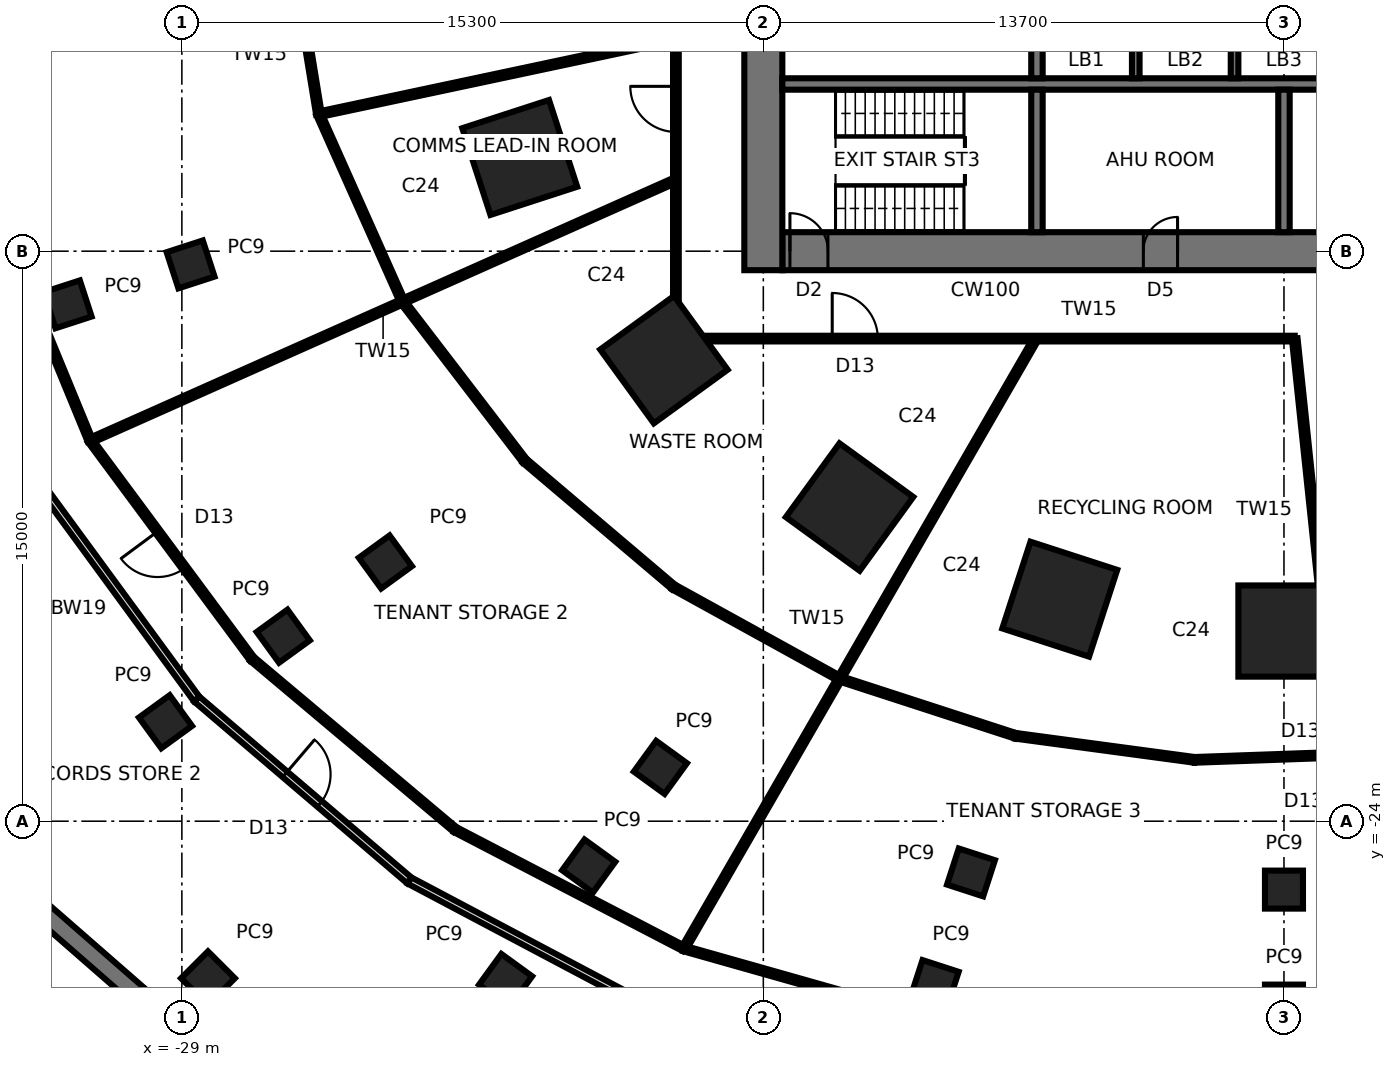
"""IFC4 building model, lengths in metres.
Left out: names, types, materials, properties, quantities, classifications, styles, units other than length and angle.
Written with IfcOpenShell. Run it as: python <this file> out.ifc"""

import sys

from ifc_helpers import new_model, si_unit, direction, frame, frame_2d, origin, origin_2d, place, context, subcontext, project, spatial, rectangle, extrude, element, fill, save


model = new_model("IFC4")
c1 = context("Model", 3, precision=1e-05, world=origin(), true_north=direction((0.0, 1.0)))
c2 = subcontext(c1, "Body", "Model", "MODEL_VIEW")
j1 = project(units=[si_unit("LENGTHUNIT", "METRE"), si_unit("PLANEANGLEUNIT", "RADIAN")], contexts=[c1])
p1 = place(None, origin())
s1 = spatial("IfcSite", under=j1, at=p1, CompositionType="ELEMENT")
p2 = place(p1, origin())
s2 = spatial("IfcBuilding", under=s1, at=p2, CompositionType="ELEMENT")
p3 = place(p2, frame((0.0, 0.0, -5.0)))
s3 = spatial("IfcBuildingStorey", under=s2, at=p3, CompositionType="ELEMENT", Elevation=-5.0)
p4 = place(p3, frame((-34.323, -24.937, -0.15), z_axis=(0.0, 0.0, 1.0), x_axis=(0.753323689885, -0.657649920747, 0.0)))
e1 = element("IfcWall", 1, at=p4, inside=s3, PredefinedType="SOLIDWALL", context=c2, shape_type="SweptSolid", body=[
    extrude(rectangle(XDim=8.822, YDim=0.5, at=frame_2d((4.411, 0.0))), origin(), (0.0, 0.0, 1.0), 4.95),
])
for number, where, z_axis, x_axis in (
    (2, (-20.109, -6.534, -0.15), (0.0, 0.0, 1.0), (-0.951, -0.309, 0.0)),
    (3, (-16.315, -11.854, -0.15), (0.0, 0.0, 1.0), (-0.809, -0.588, 0.0)),
    (4, (-11.43, -15.733, -0.15), (0.0, 0.0, 1.0), (-0.588, -0.809, 0.0)),
    (5, (-5.9, -18.157, -0.15), (0.0, 0.0, 1.0), (-0.309, -0.951, 0.0)),
    (6, (0.0, -18.996, -0.15), (0.0, 0.0, 1.0), (0.0, -1.0, 0.0)),
):
    element("IfcColumn", number, at=place(p3, frame(where, z_axis=z_axis, x_axis=x_axis)), inside=s3, PredefinedType="COLUMN", context=c2, shape_type="SweptSolid", body=[
        extrude(rectangle(XDim=2.4, YDim=2.4, at=origin_2d()), origin(), (0.0, 0.0, 1.0), 5.15),
    ])
for number, where, z_axis, x_axis in (
    (7, (-28.313, -28.133, -0.15), (0.0, 0.0, 1.0), (-0.707, -0.707, 0.0)),
    (8, (-29.431, -21.383, -0.15), (0.0, 0.0, 1.0), (-0.809, -0.588, 0.0)),
    (9, (-20.483, -28.192, -0.15), (0.0, 0.0, 1.0), (-0.588, -0.809, 0.0)),
    (10, (-32.005, -10.399, -0.15), (0.0, 0.0, 1.0), (-0.951, -0.309, 0.0)),
    (11, (-26.332, -19.131, -0.15), (0.0, 0.0, 1.0), (-0.809, -0.588, 0.0)),
    (12, (-18.294, -25.18, -0.15), (0.0, 0.0, 1.0), (-0.588, -0.809, 0.0)),
    (13, (-9.19, -28.285, -0.15), (0.0, 0.0, 1.0), (-0.309, -0.951, 0.0)),
    (14, (0.0, -28.8, -0.15), (0.0, 0.0, 1.0), (0.0, -1.0, 0.0)),
    (15, (-28.77, -9.348, -0.15), (0.0, 0.0, 1.0), (-0.951, -0.309, 0.0)),
    (16, (-23.645, -17.179, -0.15), (0.0, 0.0, 1.0), (-0.809, -0.588, 0.0)),
    (17, (-16.409, -22.584, -0.15), (0.0, 0.0, 1.0), (-0.588, -0.809, 0.0)),
    (18, (-8.236, -25.347, -0.15), (0.0, 0.0, 1.0), (-0.309, -0.951, 0.0)),
    (19, (0.0, -25.8, -0.15), (0.0, 0.0, 1.0), (0.0, -1.0, 0.0)),
):
    element("IfcColumn", number, at=place(p3, frame(where, z_axis=z_axis, x_axis=x_axis)), inside=s3, PredefinedType="COLUMN", context=c2, shape_type="SweptSolid", body=[
        extrude(rectangle(XDim=1.0, YDim=1.0, at=origin_2d()), origin(), (0.0, 0.0, 1.0), 5.15),
    ])
p5 = place(p3, frame((-13.2, -9.0, -0.15), z_axis=(0.0, 0.0, 1.0), x_axis=(1.0, 0.0, 0.0)))
e20 = element("IfcWall", 20, at=p5, inside=s3, PredefinedType="SHEAR", context=c2, shape_type="SweptSolid", body=[
    extrude(rectangle(XDim=26.4, YDim=1.0, at=frame_2d((13.2, 0.0))), origin(), (0.0, 0.0, 1.0), 5.15),
])
p6 = place(p5, frame((0.2, 0.0, 0.15)))
e21 = element("IfcOpeningElement", 21, at=p6, cuts=e20, PredefinedType="OPENING", context=c2, shape_type="SweptSolid", body=[
    extrude(rectangle(XDim=1.0, YDim=2.1, at=frame_2d((0.5, 1.05))), frame((0.0, 0.51, 0.0), z_axis=(0.0, -1.0, 0.0), x_axis=(1.0, 0.0, 0.0)), (0.0, 0.0, 1.0), 1.02),
])
p7 = place(p5, frame((9.5, 0.0, 0.15)))
e22 = element("IfcOpeningElement", 22, at=p7, cuts=e20, PredefinedType="OPENING", context=c2, shape_type="SweptSolid", body=[
    extrude(rectangle(XDim=0.9, YDim=2.1, at=frame_2d((0.45, 1.05))), frame((0.0, 0.51, 0.0), z_axis=(0.0, -1.0, 0.0), x_axis=(1.0, 0.0, 0.0)), (0.0, 0.0, 1.0), 1.02),
])
p8 = place(p5, frame((16.0, 0.0, 0.15)))
e23 = element("IfcOpeningElement", 23, at=p8, cuts=e20, PredefinedType="OPENING", context=c2, shape_type="SweptSolid", body=[
    extrude(rectangle(XDim=0.9, YDim=2.1, at=frame_2d((0.45, 1.05))), frame((0.0, 0.51, 0.0), z_axis=(0.0, -1.0, 0.0), x_axis=(1.0, 0.0, 0.0)), (0.0, 0.0, 1.0), 1.02),
])
p9 = place(p5, frame((22.85, 0.0, 0.15)))
e24 = element("IfcOpeningElement", 24, at=p9, cuts=e20, PredefinedType="OPENING", context=c2, shape_type="SweptSolid", body=[
    extrude(rectangle(XDim=0.9, YDim=2.1, at=frame_2d((0.45, 1.05))), frame((0.0, 0.51, 0.0), z_axis=(0.0, -1.0, 0.0), x_axis=(1.0, 0.0, 0.0)), (0.0, 0.0, 1.0), 1.02),
])
p10 = place(p3, frame((-13.7, 9.5, -0.15), z_axis=(0.0, 0.0, 1.0), x_axis=(0.0, -1.0, 0.0)))
e25 = element("IfcWall", 25, at=p10, inside=s3, PredefinedType="SHEAR", context=c2, shape_type="SweptSolid", body=[
    extrude(rectangle(XDim=19.0, YDim=1.0, at=frame_2d((9.5, 0.0))), origin(), (0.0, 0.0, 1.0), 5.15),
])
p11 = place(p10, frame((8.6, 0.0, 0.15)))
e26 = element("IfcOpeningElement", 26, at=p11, cuts=e25, PredefinedType="OPENING", context=c2, shape_type="SweptSolid", body=[
    extrude(rectangle(XDim=1.8, YDim=2.4, at=frame_2d((0.9, 1.2))), frame((0.0, 0.51, 0.0), z_axis=(0.0, -1.0, 0.0), x_axis=(1.0, 0.0, 0.0)), (0.0, 0.0, 1.0), 1.02),
])
p12 = place(p3, frame((-13.2, -4.6, -0.15), z_axis=(0.0, 0.0, 1.0), x_axis=(1.0, 0.0, 0.0)))
e27 = element("IfcWall", 27, at=p12, inside=s3, PredefinedType="SHEAR", context=c2, shape_type="SweptSolid", body=[
    extrude(rectangle(XDim=26.4, YDim=0.3, at=frame_2d((13.2, 0.0))), origin(), (0.0, 0.0, 1.0), 5.15),
])
p13 = place(p3, frame((-6.5, -1.75, -0.15), z_axis=(0.0, 0.0, 1.0), x_axis=(0.0, -1.0, 0.0)))
e28 = element("IfcWall", 28, at=p13, inside=s3, PredefinedType="SHEAR", context=c2, shape_type="SweptSolid", body=[
    extrude(rectangle(XDim=2.7, YDim=0.3, at=frame_2d((1.35, 0.0))), origin(), (0.0, 0.0, 1.0), 5.15),
])
p14 = place(p3, frame((-6.5, -4.75, -0.15), z_axis=(0.0, 0.0, 1.0), x_axis=(0.0, -1.0, 0.0)))
e29 = element("IfcWall", 29, at=p14, inside=s3, PredefinedType="SHEAR", context=c2, shape_type="SweptSolid", body=[
    extrude(rectangle(XDim=3.75, YDim=0.3, at=frame_2d((1.875, 0.0))), origin(), (0.0, 0.0, 1.0), 5.15),
])
for number, where, z_axis, x_axis in (
    (30, (-3.9, -1.75, -0.15), (0.0, 0.0, 1.0), (0.0, -1.0, 0.0)),
    (31, (-1.3, -1.75, -0.15), (0.0, 0.0, 1.0), (0.0, -1.0, 0.0)),
):
    element("IfcWall", number, at=place(p3, frame(where, z_axis=z_axis, x_axis=x_axis)), inside=s3, PredefinedType="SHEAR", context=c2, shape_type="SweptSolid", body=[
        extrude(rectangle(XDim=2.7, YDim=0.2, at=frame_2d((1.35, 0.0))), origin(), (0.0, 0.0, 1.0), 5.15),
    ])
p15 = place(p3, frame((0.0, -4.75, -0.15), z_axis=(0.0, 0.0, 1.0), x_axis=(0.0, -1.0, 0.0)))
e32 = element("IfcWall", 32, at=p15, inside=s3, PredefinedType="SHEAR", context=c2, shape_type="SweptSolid", body=[
    extrude(rectangle(XDim=3.75, YDim=0.3, at=frame_2d((1.875, 0.0))), origin(), (0.0, 0.0, 1.0), 5.15),
])
p16 = place(p3, frame((-25.393, -5.397, 0.0), z_axis=(0.0, 0.0, 1.0), x_axis=(-0.161241932964, 0.986914909733, 0.0)))
e33 = element("IfcWall", 33, at=p16, inside=s3, PredefinedType="PARTITIONING", context=c2, shape_type="SweptSolid", body=[
    extrude(rectangle(XDim=5.469, YDim=0.15, at=frame_2d((2.734, 0.0))), origin(), (0.0, 0.0, 1.0), 4.8),
])
p17 = place(p3, frame((-16.0, -3.401, 0.0), z_axis=(0.0, 0.0, 1.0), x_axis=(-0.978147089661, -0.207914095214, 0.0)))
e34 = element("IfcWall", 34, at=p17, inside=s3, PredefinedType="PARTITIONING", context=c2, shape_type="SweptSolid", body=[
    extrude(rectangle(XDim=9.603, YDim=0.15, at=frame_2d((4.802, 0.0))), origin(), (0.0, 0.0, 1.0), 4.8),
])
p18 = place(p3, frame((-16.0, 2.481, 0.0), z_axis=(0.0, 0.0, 1.0), x_axis=(0.0, -1.0, 0.0)))
e35 = element("IfcWall", 35, at=p18, inside=s3, PredefinedType="PARTITIONING", context=c2, shape_type="SweptSolid", body=[
    extrude(rectangle(XDim=13.781, YDim=0.15, at=frame_2d((6.89, 0.0))), origin(), (0.0, 0.0, 1.0), 4.8),
])
p19 = place(p18, frame((7.143, 0.0, 0.0)))
e36 = element("IfcOpeningElement", 36, at=p19, cuts=e35, PredefinedType="OPENING", context=c2, shape_type="SweptSolid", body=[
    extrude(rectangle(XDim=1.2, YDim=2.1, at=frame_2d((0.6, 1.05))), frame((0.0, 0.085, 0.0), z_axis=(0.0, -1.0, 0.0), x_axis=(1.0, 0.0, 0.0)), (0.0, 0.0, 1.0), 0.17),
])
p20 = place(p3, frame((-23.193, -10.326, 0.0), z_axis=(0.0, 0.0, 1.0), x_axis=(-0.40763198254, 0.91314630088, 0.0)))
e37 = element("IfcWall", 37, at=p20, inside=s3, PredefinedType="PARTITIONING", context=c2, shape_type="SweptSolid", body=[
    extrude(rectangle(XDim=5.397, YDim=0.15, at=frame_2d((2.699, 0.0))), origin(), (0.0, 0.0, 1.0), 4.8),
])
p21 = place(p3, frame((-31.41, -13.985, 0.0), z_axis=(0.0, 0.0, 1.0), x_axis=(-0.380714323158, 0.924692707954, 0.0)))
e38 = element("IfcWall", 38, at=p21, inside=s3, PredefinedType="PARTITIONING", context=c2, shape_type="SweptSolid", body=[
    extrude(rectangle(XDim=7.268, YDim=0.15, at=frame_2d((3.634, 0.0))), origin(), (0.0, 0.0, 1.0), 4.8),
])
p22 = place(p3, frame((-16.0, -7.124, 0.0), z_axis=(0.0, 0.0, 1.0), x_axis=(-0.913549946031, -0.40672656184, 0.0)))
e39 = element("IfcWall", 39, at=p22, inside=s3, PredefinedType="PARTITIONING", context=c2, shape_type="SweptSolid", body=[
    extrude(rectangle(XDim=16.868, YDim=0.15, at=frame_2d((8.434, 0.0))), origin(), (0.0, 0.0, 1.0), 4.8),
])
p23 = place(p3, frame((-19.98, -14.516, 0.0), z_axis=(0.0, 0.0, 1.0), x_axis=(-0.608481047622, 0.793568405801, 0.0)))
e40 = element("IfcWall", 40, at=p23, inside=s3, PredefinedType="PARTITIONING", context=c2, shape_type="SweptSolid", body=[
    extrude(rectangle(XDim=5.28, YDim=0.15, at=frame_2d((2.64, 0.0))), origin(), (0.0, 0.0, 1.0), 4.8),
])
p24 = place(p3, frame((-27.153, -19.728, 0.0), z_axis=(0.0, 0.0, 1.0), x_axis=(-0.595449673077, 0.803392610641, 0.0)))
e41 = element("IfcWall", 41, at=p24, inside=s3, PredefinedType="PARTITIONING", context=c2, shape_type="SweptSolid", body=[
    extrude(rectangle(XDim=7.149, YDim=0.15, at=frame_2d((3.574, 0.0))), origin(), (0.0, 0.0, 1.0), 4.8),
])
p25 = place(p24, frame((2.974, 0.0, 0.0)))
e42 = element("IfcOpeningElement", 42, at=p25, cuts=e41, PredefinedType="OPENING", context=c2, shape_type="SweptSolid", body=[
    extrude(rectangle(XDim=1.2, YDim=2.4, at=frame_2d((0.6, 1.2))), frame((0.0, 0.085, 0.0), z_axis=(0.0, -1.0, 0.0), x_axis=(1.0, 0.0, 0.0)), (0.0, 0.0, 1.0), 0.17),
])
p26 = place(p3, frame((-33.054, -14.717, 0.0), z_axis=(0.0, 0.0, 1.0), x_axis=(0.590858446285, -0.806775245315, 0.0)))
e43 = element("IfcWall", 43, at=p26, inside=s3, PredefinedType="SOLIDWALL", context=c2, shape_type="SweptSolid", body=[
    extrude(rectangle(XDim=7.523, YDim=0.19, at=frame_2d((3.761, 0.0))), origin(), (0.0, 0.0, 1.0), 4.8),
])
p27 = place(p3, frame((-21.809, -24.222, 0.0), z_axis=(0.0, 0.0, 1.0), x_axis=(-0.765373437874, 0.643586435995, 0.0)))
e44 = element("IfcWall", 44, at=p27, inside=s3, PredefinedType="PARTITIONING", context=c2, shape_type="SweptSolid", body=[
    extrude(rectangle(XDim=6.982, YDim=0.15, at=frame_2d((3.491, 0.0))), origin(), (0.0, 0.0, 1.0), 4.8),
])
p28 = place(p3, frame((-16.062, -17.839, 0.0), z_axis=(0.0, 0.0, 1.0), x_axis=(-0.762708036384, 0.646742956077, 0.0)))
e45 = element("IfcWall", 45, at=p28, inside=s3, PredefinedType="PARTITIONING", context=c2, shape_type="SweptSolid", body=[
    extrude(rectangle(XDim=5.137, YDim=0.15, at=frame_2d((2.568, 0.0))), origin(), (0.0, 0.0, 1.0), 4.8),
])
p29 = place(p3, frame((-28.61, -20.786, 0.0), z_axis=(0.0, 0.0, 1.0), x_axis=(0.760805512378, -0.64897994756, 0.0)))
e46 = element("IfcWall", 46, at=p29, inside=s3, PredefinedType="SOLIDWALL", context=c2, shape_type="SweptSolid", body=[
    extrude(rectangle(XDim=7.355, YDim=0.19, at=frame_2d((3.678, 0.0))), origin(), (0.0, 0.0, 1.0), 4.8),
])
p30 = place(p29, frame((3.053, 0.0, 0.0)))
e47 = element("IfcOpeningElement", 47, at=p30, cuts=e46, PredefinedType="OPENING", context=c2, shape_type="SweptSolid", body=[
    extrude(rectangle(XDim=1.2, YDim=2.4, at=frame_2d((0.6, 1.2))), frame((0.0, 0.105, 0.0), z_axis=(0.0, -1.0, 0.0), x_axis=(1.0, 0.0, 0.0)), (0.0, 0.0, 1.0), 0.21),
])
p31 = place(p3, frame((-15.791, -27.35, 0.0), z_axis=(0.0, 0.0, 1.0), x_axis=(-0.887313425563, 0.461166873068, 0.0)))
e48 = element("IfcWall", 48, at=p31, inside=s3, PredefinedType="PARTITIONING", context=c2, shape_type="SweptSolid", body=[
    extrude(rectangle(XDim=6.783, YDim=0.15, at=frame_2d((3.392, 0.0))), origin(), (0.0, 0.0, 1.0), 4.8),
])
p32 = place(p3, frame((-23.014, -25.559, 0.0), z_axis=(0.0, 0.0, 1.0), x_axis=(0.883685814524, -0.468080528551, 0.0)))
e49 = element("IfcWall", 49, at=p32, inside=s3, PredefinedType="SOLIDWALL", context=c2, shape_type="SweptSolid", body=[
    extrude(rectangle(XDim=7.156, YDim=0.19, at=frame_2d((3.578, 0.0))), origin(), (0.0, 0.0, 1.0), 4.8),
])
p33 = place(p3, frame((-11.691, -20.25, 0.0), z_axis=(0.0, 0.0, 1.0), x_axis=(-0.875641162684, 0.482962269968, 0.0)))
e50 = element("IfcWall", 50, at=p33, inside=s3, PredefinedType="PARTITIONING", context=c2, shape_type="SweptSolid", body=[
    extrude(rectangle(XDim=4.992, YDim=0.15, at=frame_2d((2.496, 0.0))), origin(), (0.0, 0.0, 1.0), 4.8),
])
p34 = place(p3, frame((-16.0, -11.3, 0.0), z_axis=(0.0, 0.0, 1.0), x_axis=(1.0, 0.0, 0.0)))
e51 = element("IfcWall", 51, at=p34, inside=s3, PredefinedType="PARTITIONING", context=c2, shape_type="SweptSolid", body=[
    extrude(rectangle(XDim=16.283, YDim=0.15, at=frame_2d((8.141, 0.0))), origin(), (0.0, 0.0, 1.0), 4.8),
])
p35 = place(p34, frame((4.113, 0.0, 0.0)))
e52 = element("IfcOpeningElement", 52, at=p35, cuts=e51, PredefinedType="OPENING", context=c2, shape_type="SweptSolid", body=[
    extrude(rectangle(XDim=1.2, YDim=2.4, at=frame_2d((0.6, 1.2))), frame((0.0, 0.085, 0.0), z_axis=(0.0, -1.0, 0.0), x_axis=(1.0, 0.0, 0.0)), (0.0, 0.0, 1.0), 0.17),
])
p36 = place(p3, frame((-6.524, -11.3, 0.0), z_axis=(0.0, 0.0, 1.0), x_axis=(-0.499999933838, -0.866025441983, 0.0)))
e53 = element("IfcWall", 53, at=p36, inside=s3, PredefinedType="PARTITIONING", context=c2, shape_type="SweptSolid", body=[
    extrude(rectangle(XDim=18.533, YDim=0.15, at=frame_2d((9.266, 0.0))), origin(), (0.0, 0.0, 1.0), 4.8),
])
p37 = place(p3, frame((-9.468, -29.139, 0.0), z_axis=(0.0, 0.0, 1.0), x_axis=(-0.962199616319, 0.272345182362, 0.0)))
e54 = element("IfcWall", 54, at=p37, inside=s3, PredefinedType="PARTITIONING", context=c2, shape_type="SweptSolid", body=[
    extrude(rectangle(XDim=6.571, YDim=0.15, at=frame_2d((3.285, 0.0))), origin(), (0.0, 0.0, 1.0), 4.8),
])
p38 = place(p3, frame((-7.068, -21.752, 0.0), z_axis=(0.0, 0.0, 1.0), x_axis=(-0.951027056342, 0.309107648085, 0.0)))
e55 = element("IfcWall", 55, at=p38, inside=s3, PredefinedType="PARTITIONING", context=c2, shape_type="SweptSolid", body=[
    extrude(rectangle(XDim=4.861, YDim=0.15, at=frame_2d((2.431, 0.0))), origin(), (0.0, 0.0, 1.0), 4.8),
])
p39 = place(p3, frame((-2.353, -22.386, 0.0), z_axis=(0.0, 0.0, 1.0), x_axis=(-0.991085698144, 0.133225894386, 0.0)))
e56 = element("IfcWall", 56, at=p39, inside=s3, PredefinedType="PARTITIONING", context=c2, shape_type="SweptSolid", body=[
    extrude(rectangle(XDim=4.757, YDim=0.15, at=frame_2d((2.379, 0.0))), origin(), (0.0, 0.0, 1.0), 4.8),
])
p40 = place(p3, frame((1.434, -22.252, 0.0), z_axis=(0.0, 0.0, 1.0), x_axis=(-0.999374131302, -0.035374364802, 0.0)))
e57 = element("IfcWall", 57, at=p40, inside=s3, PredefinedType="PARTITIONING", context=c2, shape_type="SweptSolid", body=[
    extrude(rectangle(XDim=3.789, YDim=0.15, at=frame_2d((1.895, 0.0))), origin(), (0.0, 0.0, 1.0), 4.8),
])
p41 = place(p3, frame((0.283, -11.3, 0.0), z_axis=(0.0, 0.0, 1.0), x_axis=(0.104534657703, -0.994521244287, 0.0)))
e58 = element("IfcWall", 58, at=p41, inside=s3, PredefinedType="PARTITIONING", context=c2, shape_type="SweptSolid", body=[
    extrude(rectangle(XDim=18.2, YDim=0.15, at=frame_2d((9.1, 0.0))), origin(), (0.0, 0.0, 1.0), 4.8),
])
p42 = place(p41, frame((8.95, 0.0, 0.0)))
e59 = element("IfcOpeningElement", 59, at=p42, cuts=e58, PredefinedType="OPENING", context=c2, shape_type="SweptSolid", body=[
    extrude(rectangle(XDim=1.2, YDim=2.4, at=frame_2d((0.6, 1.2))), frame((0.0, 0.085, 0.0), z_axis=(0.0, -1.0, 0.0), x_axis=(1.0, 0.0, 0.0)), (0.0, 0.0, 1.0), 0.17),
])
p43 = place(p41, frame((14.586, 0.0, 0.0)))
e60 = element("IfcOpeningElement", 60, at=p43, cuts=e58, PredefinedType="OPENING", context=c2, shape_type="SweptSolid", body=[
    extrude(rectangle(XDim=1.2, YDim=2.4, at=frame_2d((0.6, 1.2))), frame((0.0, 0.085, 0.0), z_axis=(0.0, -1.0, 0.0), x_axis=(1.0, 0.0, 0.0)), (0.0, 0.0, 1.0), 0.17),
])
p44 = place(p6, origin())
e61 = element("IfcDoor", 61, at=p44, inside=s3, OperationType="SINGLE_SWING_LEFT", PredefinedType="DOOR", context=c2, shape_type="SweptSolid", body=[
    extrude(rectangle(XDim=0.92, YDim=2.06, at=frame_2d((0.5, 1.03))), frame((0.0, 0.025, 0.0), z_axis=(0.0, -1.0, 0.0), x_axis=(1.0, 0.0, 0.0)), (0.0, 0.0, 1.0), 0.05),
    extrude(rectangle(XDim=0.04, YDim=2.1, at=frame_2d((0.02, 1.05))), frame((0.0, 0.25, 0.0), z_axis=(0.0, -1.0, 0.0), x_axis=(1.0, 0.0, 0.0)), (0.0, 0.0, 1.0), 0.5),
    extrude(rectangle(XDim=0.04, YDim=2.1, at=frame_2d((0.98, 1.05))), frame((0.0, 0.25, 0.0), z_axis=(0.0, -1.0, 0.0), x_axis=(1.0, 0.0, 0.0)), (0.0, 0.0, 1.0), 0.5),
    extrude(rectangle(XDim=0.92, YDim=0.04, at=frame_2d((0.5, 2.08))), frame((0.0, 0.25, 0.0), z_axis=(0.0, -1.0, 0.0), x_axis=(1.0, 0.0, 0.0)), (0.0, 0.0, 1.0), 0.5),
])
fill(e21, e61)
p45 = place(p7, origin())
e62 = element("IfcDoor", 62, at=p45, inside=s3, OperationType="SINGLE_SWING_RIGHT", PredefinedType="DOOR", context=c2, shape_type="SweptSolid", body=[
    extrude(rectangle(XDim=0.82, YDim=2.06, at=frame_2d((0.45, 1.03))), frame((0.0, 0.025, 0.0), z_axis=(0.0, -1.0, 0.0), x_axis=(1.0, 0.0, 0.0)), (0.0, 0.0, 1.0), 0.05),
    extrude(rectangle(XDim=0.04, YDim=2.1, at=frame_2d((0.02, 1.05))), frame((0.0, 0.25, 0.0), z_axis=(0.0, -1.0, 0.0), x_axis=(1.0, 0.0, 0.0)), (0.0, 0.0, 1.0), 0.5),
    extrude(rectangle(XDim=0.04, YDim=2.1, at=frame_2d((0.88, 1.05))), frame((0.0, 0.25, 0.0), z_axis=(0.0, -1.0, 0.0), x_axis=(1.0, 0.0, 0.0)), (0.0, 0.0, 1.0), 0.5),
    extrude(rectangle(XDim=0.82, YDim=0.04, at=frame_2d((0.45, 2.08))), frame((0.0, 0.25, 0.0), z_axis=(0.0, -1.0, 0.0), x_axis=(1.0, 0.0, 0.0)), (0.0, 0.0, 1.0), 0.5),
])
fill(e22, e62)
p46 = place(p19, frame((1.2, 0.0, 0.0), z_axis=(0.0, 0.0, 1.0), x_axis=(-1.0, 0.0, 0.0)))
e63 = element("IfcDoor", 63, at=p46, inside=s3, OperationType="SINGLE_SWING_RIGHT", PredefinedType="DOOR", context=c2, shape_type="SweptSolid", body=[
    extrude(rectangle(XDim=1.2, YDim=2.1, at=frame_2d((0.6, 1.05))), frame((0.0, 0.025, 0.0), z_axis=(0.0, -1.0, 0.0), x_axis=(1.0, 0.0, 0.0)), (0.0, 0.0, 1.0), 0.05),
])
fill(e36, e63)
p47 = place(p35, origin())
e64 = element("IfcDoor", 64, at=p47, inside=s3, OperationType="SINGLE_SWING_LEFT", PredefinedType="DOOR", context=c2, shape_type="SweptSolid", body=[
    extrude(rectangle(XDim=1.2, YDim=2.4, at=frame_2d((0.6, 1.2))), frame((0.0, 0.025, 0.0), z_axis=(0.0, -1.0, 0.0), x_axis=(1.0, 0.0, 0.0)), (0.0, 0.0, 1.0), 0.05),
])
fill(e52, e64)
p48 = place(p25, origin())
e65 = element("IfcDoor", 65, at=p48, inside=s3, OperationType="SINGLE_SWING_RIGHT", PredefinedType="DOOR", context=c2, shape_type="SweptSolid", body=[
    extrude(rectangle(XDim=1.2, YDim=2.4, at=frame_2d((0.6, 1.2))), frame((0.0, 0.025, 0.0), z_axis=(0.0, -1.0, 0.0), x_axis=(1.0, 0.0, 0.0)), (0.0, 0.0, 1.0), 0.05),
])
fill(e42, e65)
p49 = place(p30, origin())
e66 = element("IfcDoor", 66, at=p49, inside=s3, OperationType="SINGLE_SWING_LEFT", PredefinedType="DOOR", context=c2, shape_type="SweptSolid", body=[
    extrude(rectangle(XDim=1.2, YDim=2.4, at=frame_2d((0.6, 1.2))), frame((0.0, 0.025, 0.0), z_axis=(0.0, -1.0, 0.0), x_axis=(1.0, 0.0, 0.0)), (0.0, 0.0, 1.0), 0.05),
])
fill(e47, e66)
save(model, sys.argv[1])
